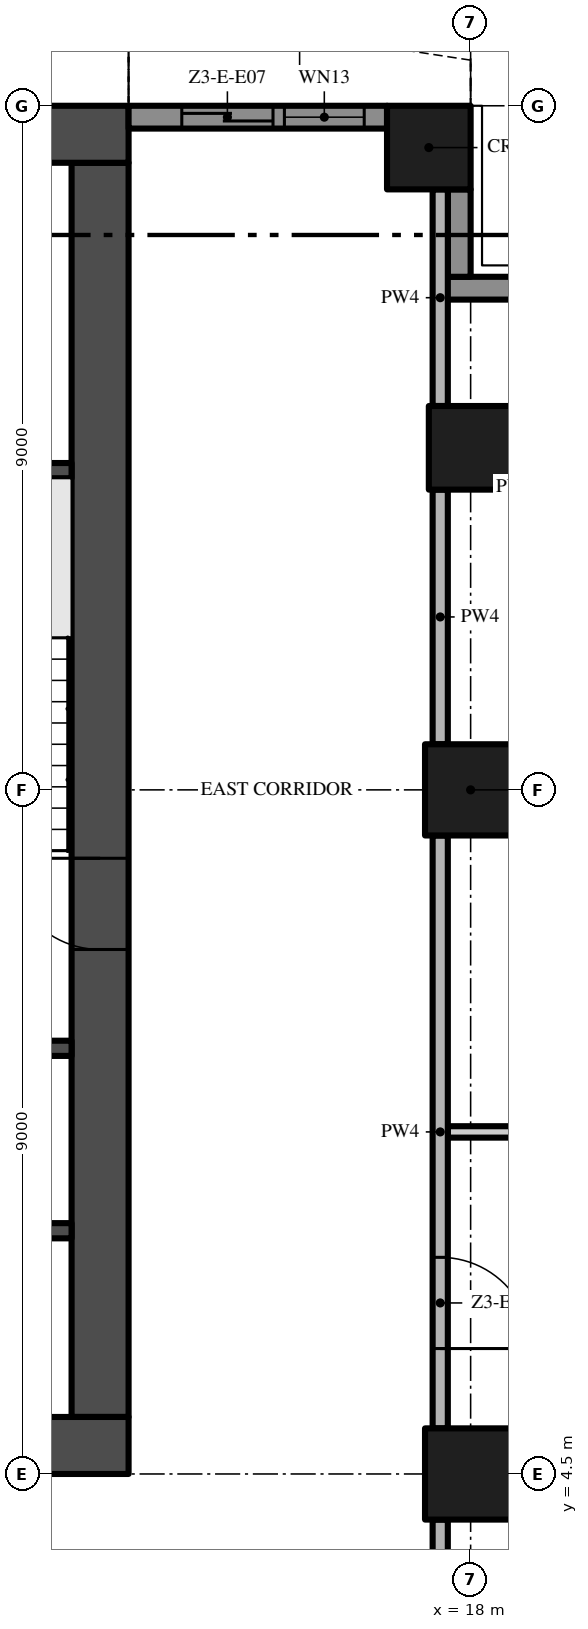
"""IFC4 building model, lengths in metres.
Left out: names, types, materials, properties, quantities, classifications, styles, units other than length and angle.
Written with IfcOpenShell. Run it as: python <this file> out.ifc"""

import sys

from ifc_helpers import new_model, si_unit, direction, frame, frame_2d, origin, origin_2d, place, context, subcontext, project, spatial, polyline, rectangle, outline, extrude, element, fill, save


model = new_model("IFC4")
c1 = context("Model", 3, precision=1e-05, world=origin(), true_north=direction((0.0, 1.0)))
c2 = subcontext(c1, "Body", "Model", "MODEL_VIEW")
j1 = project(units=[si_unit("LENGTHUNIT", "METRE"), si_unit("PLANEANGLEUNIT", "RADIAN")], contexts=[c1])
p1 = place(None, origin())
s1 = spatial("IfcSite", under=j1, at=p1, CompositionType="ELEMENT")
p2 = place(p1, origin())
s2 = spatial("IfcBuilding", under=s1, at=p2, CompositionType="ELEMENT")
p3 = place(p2, frame((0.0, 0.0, 166.8)))
s3 = spatial("IfcBuildingStorey", under=s2, at=p3, CompositionType="ELEMENT", Elevation=166.8)
p4 = place(p3, frame((-13.5, 4.875, -0.3), z_axis=(0.0, 0.0, 1.0), x_axis=(1.0, 0.0, 0.0)))
e1 = element("IfcWall", 1, at=p4, inside=s3, PredefinedType="SHEAR", context=c2, shape_type="SweptSolid", body=[
    extrude(rectangle(XDim=27.0, YDim=0.75, at=frame_2d((13.5, 0.0))), origin(), (0.0, 0.0, 1.0), 3.8),
])
p5 = place(p4, frame((12.0, 0.0, 0.3)))
e2 = element("IfcOpeningElement", 2, at=p5, cuts=e1, PredefinedType="OPENING", context=c2, shape_type="SweptSolid", body=[
    extrude(rectangle(XDim=3.0, YDim=2.4, at=frame_2d((1.5, 1.2))), frame((0.0, 0.385, 0.0), z_axis=(0.0, -1.0, 0.0), x_axis=(1.0, 0.0, 0.0)), (0.0, 0.0, 1.0), 0.77),
])
p6 = place(p4, frame((4.9, 0.0, 0.3)))
e3 = element("IfcOpeningElement", 3, at=p6, cuts=e1, PredefinedType="OPENING", context=c2, shape_type="SweptSolid", body=[
    extrude(rectangle(XDim=1.2, YDim=2.2, at=frame_2d((0.6, 1.1))), frame((0.0, 0.385, 0.0), z_axis=(0.0, -1.0, 0.0), x_axis=(1.0, 0.0, 0.0)), (0.0, 0.0, 1.0), 0.77),
])
p7 = place(p4, frame((20.75, 0.0, 0.3)))
e4 = element("IfcOpeningElement", 4, at=p7, cuts=e1, PredefinedType="OPENING", context=c2, shape_type="SweptSolid", body=[
    extrude(rectangle(XDim=1.5, YDim=2.2, at=frame_2d((0.75, 1.1))), frame((0.0, 0.385, 0.0), z_axis=(0.0, -1.0, 0.0), x_axis=(1.0, 0.0, 0.0)), (0.0, 0.0, 1.0), 0.77),
])
p8 = place(p4, frame((17.4, 0.0, 0.3)))
e5 = element("IfcOpeningElement", 5, at=p8, cuts=e1, PredefinedType="OPENING", context=c2, shape_type="SweptSolid", body=[
    extrude(rectangle(XDim=1.2, YDim=2.2, at=frame_2d((0.6, 1.1))), frame((0.0, 0.385, 0.0), z_axis=(0.0, -1.0, 0.0), x_axis=(1.0, 0.0, 0.0)), (0.0, 0.0, 1.0), 0.77),
])
p9 = place(p3, frame((13.125, 5.25, -0.3), z_axis=(0.0, 0.0, 1.0), x_axis=(0.0, 1.0, 0.0)))
e6 = element("IfcWall", 6, at=p9, inside=s3, PredefinedType="SHEAR", context=c2, shape_type="SweptSolid", body=[
    extrude(rectangle(XDim=16.5, YDim=0.75, at=frame_2d((8.25, 0.0))), origin(), (0.0, 0.0, 1.0), 3.8),
])
p10 = place(p9, frame((6.15, 0.0, 0.3)))
e7 = element("IfcOpeningElement", 7, at=p10, cuts=e6, PredefinedType="OPENING", context=c2, shape_type="SweptSolid", body=[
    extrude(rectangle(XDim=1.2, YDim=2.2, at=frame_2d((0.6, 1.1))), frame((0.0, 0.385, 0.0), z_axis=(0.0, -1.0, 0.0), x_axis=(1.0, 0.0, 0.0)), (0.0, 0.0, 1.0), 0.77),
])
p11 = place(p3, frame((13.5, 22.125, -0.3), z_axis=(0.0, 0.0, 1.0), x_axis=(-1.0, 0.0, 0.0)))
e8 = element("IfcWall", 8, at=p11, inside=s3, PredefinedType="SHEAR", context=c2, shape_type="SweptSolid", body=[
    extrude(rectangle(XDim=27.0, YDim=0.75, at=frame_2d((13.5, 0.0))), origin(), (0.0, 0.0, 1.0), 3.8),
])
p12 = place(p3, frame((18.0, 13.5, 0.0), z_axis=(0.0, 0.0, 1.0), x_axis=(1.0, 0.0, 0.0)))
e9 = element("IfcColumn", 9, at=p12, inside=s3, PredefinedType="COLUMN", context=c2, shape_type="SweptSolid", body=[
    extrude(rectangle(XDim=1.2, YDim=1.2, at=origin_2d()), origin(), (0.0, 0.0, 1.0), 3.5),
])
p13 = place(p3, frame((17.45, 21.95, 0.0), z_axis=(0.0, 0.0, 1.0), x_axis=(1.0, 0.0, 0.0)))
e10 = element("IfcColumn", 10, at=p13, inside=s3, PredefinedType="COLUMN", context=c2, shape_type="SweptSolid", body=[
    extrude(rectangle(XDim=1.1, YDim=1.1, at=origin_2d()), origin(), (0.0, 0.0, 1.0), 3.5),
])
p14 = place(p3, frame((18.0, 4.5, 0.0), z_axis=(0.0, 0.0, 1.0), x_axis=(1.0, 0.0, 0.0)))
e11 = element("IfcColumn", 11, at=p14, inside=s3, PredefinedType="COLUMN", context=c2, shape_type="SweptSolid", body=[
    extrude(rectangle(XDim=1.2, YDim=1.2, at=origin_2d()), origin(), (0.0, 0.0, 1.0), 3.5),
])
p15 = place(p3, frame((18.0, 18.0, 0.0), z_axis=(0.0, 0.0, 1.0), x_axis=(1.0, 0.0, 0.0)))
e12 = element("IfcColumn", 12, at=p15, inside=s3, PredefinedType="COLUMN", context=c2, shape_type="SweptSolid", body=[
    extrude(rectangle(XDim=1.1, YDim=1.1, at=origin_2d()), origin(), (0.0, 0.0, 1.0), 3.5),
])
p16 = place(p3, frame((17.6, 20.1, 0.0), z_axis=(0.0, 0.0, 1.0), x_axis=(1.0, 0.0, 0.0)))
e13 = element("IfcWall", 13, at=p16, inside=s3, PredefinedType="SOLIDWALL", context=c2, shape_type="SweptSolid", body=[
    extrude(rectangle(XDim=2.35, YDim=0.3, at=frame_2d((1.175, 0.0))), origin(), (0.0, 0.0, 1.0), 3.5),
])
p17 = place(p3, frame((17.85, 21.4, 0.0), z_axis=(0.0, 0.0, 1.0), x_axis=(0.0, -1.0, 0.0)))
e14 = element("IfcWall", 14, at=p17, inside=s3, PredefinedType="SOLIDWALL", context=c2, shape_type="SweptSolid", body=[
    extrude(rectangle(XDim=1.15, YDim=0.3, at=frame_2d((0.575, 0.0))), origin(), (0.0, 0.0, 1.0), 3.5),
])
p18 = place(p3, frame((13.5, 22.35, 0.0), z_axis=(0.0, 0.0, 1.0), x_axis=(1.0, 0.0, 0.0)))
e15 = element("IfcWall", 15, at=p18, inside=s3, PredefinedType="SOLIDWALL", context=c2, shape_type="SweptSolid", body=[
    extrude(rectangle(XDim=3.4, YDim=0.3, at=frame_2d((1.7, 0.0))), origin(), (0.0, 0.0, 1.0), 3.5),
])
p19 = place(p18, frame((2.05, 0.0, 0.45)))
e16 = element("IfcOpeningElement", 16, at=p19, cuts=e15, PredefinedType="OPENING", context=c2, shape_type="SweptSolid", body=[
    extrude(rectangle(XDim=1.05, YDim=2.65, at=frame_2d((0.525, 1.325))), frame((0.0, 0.16, 0.0), z_axis=(0.0, -1.0, 0.0), x_axis=(1.0, 0.0, 0.0)), (0.0, 0.0, 1.0), 0.32),
])
p20 = place(p18, frame((0.7, 0.0, 0.0)))
e17 = element("IfcOpeningElement", 17, at=p20, cuts=e15, PredefinedType="OPENING", context=c2, shape_type="SweptSolid", body=[
    extrude(rectangle(XDim=1.2, YDim=2.4, at=frame_2d((0.6, 1.2))), frame((0.0, 0.16, 0.0), z_axis=(0.0, -1.0, 0.0), x_axis=(1.0, 0.0, 0.0)), (0.0, 0.0, 1.0), 0.32),
])
p21 = place(p3, origin())
e18 = element("IfcWall", 18, at=p21, inside=s3, PredefinedType="USERDEFINED", context=c2, shape_type="SweptSolid", body=[
    extrude(outline(polyline([(18.0, 23.1), (16.5, 23.329), (15.0, 23.929), (13.5, 24.671), (13.389, 24.447), (14.898, 23.701), (16.434, 23.086), (17.962, 22.853), (18.0, 23.1)])), origin(), (0.0, 0.0, 1.0), 0.9),
])
for number, where, z_axis, x_axis in (
    (19, (9.65, 7.7, 0.0), (0.0, 0.0, 1.0), (1.0, 0.0, 0.0)),
    (20, (9.65, 10.1, 0.0), (0.0, 0.0, 1.0), (1.0, 0.0, 0.0)),
    (21, (9.65, 17.7, 0.0), (0.0, 0.0, 1.0), (1.0, 0.0, 0.0)),
):
    element("IfcWall", number, at=place(p3, frame(where, z_axis=z_axis, x_axis=x_axis)), inside=s3, PredefinedType="SHEAR", context=c2, shape_type="SweptSolid", body=[
        extrude(rectangle(XDim=3.1, YDim=0.2, at=frame_2d((1.55, 0.0))), origin(), (0.0, 0.0, 1.0), 3.5),
    ])
p22 = place(p3, frame((17.7, 9.0, 0.0), z_axis=(0.0, 0.0, 1.0), x_axis=(1.0, 0.0, 0.0)))
e22 = element("IfcWall", 22, at=p22, inside=s3, PredefinedType="PARTITIONING", context=c2, shape_type="SweptSolid", body=[
    extrude(rectangle(XDim=4.5, YDim=0.15, at=frame_2d((2.25, 0.0))), origin(), (0.0, 0.0, 1.0), 3.5),
])
p23 = place(p22, frame((1.45, 0.0, 0.0)))
e23 = element("IfcOpeningElement", 23, at=p23, cuts=e22, PredefinedType="OPENING", context=c2, shape_type="SweptSolid", body=[
    extrude(rectangle(XDim=1.8, YDim=2.4, at=frame_2d((0.9, 1.2))), frame((0.0, 0.085, 0.0), z_axis=(0.0, -1.0, 0.0), x_axis=(1.0, 0.0, 0.0)), (0.0, 0.0, 1.0), 0.17),
])
p24 = place(p3, frame((17.6, -0.2, 0.0), z_axis=(0.0, 0.0, 1.0), x_axis=(0.0, 1.0, 0.0)))
e24 = element("IfcWall", 24, at=p24, inside=s3, PredefinedType="PARTITIONING", context=c2, shape_type="SweptSolid", body=[
    extrude(rectangle(XDim=4.1, YDim=0.2, at=frame_2d((2.05, 0.0))), origin(), (0.0, 0.0, 1.0), 3.5),
])
p25 = place(p3, frame((17.6, 12.9, 0.0), z_axis=(0.0, 0.0, 1.0), x_axis=(0.0, -1.0, 0.0)))
e25 = element("IfcWall", 25, at=p25, inside=s3, PredefinedType="PARTITIONING", context=c2, shape_type="SweptSolid", body=[
    extrude(rectangle(XDim=7.8, YDim=0.2, at=frame_2d((3.9, 0.0))), origin(), (0.0, 0.0, 1.0), 3.5),
])
p26 = place(p25, frame((5.55, 0.0, 0.0)))
e26 = element("IfcOpeningElement", 26, at=p26, cuts=e25, PredefinedType="OPENING", context=c2, shape_type="SweptSolid", body=[
    extrude(rectangle(XDim=1.2, YDim=2.4, at=frame_2d((0.6, 1.2))), frame((0.0, 0.11, 0.0), z_axis=(0.0, -1.0, 0.0), x_axis=(1.0, 0.0, 0.0)), (0.0, 0.0, 1.0), 0.22),
])
p27 = place(p3, frame((17.6, 14.1, 0.0), z_axis=(0.0, 0.0, 1.0), x_axis=(0.0, 1.0, 0.0)))
e27 = element("IfcWall", 27, at=p27, inside=s3, PredefinedType="PARTITIONING", context=c2, shape_type="SweptSolid", body=[
    extrude(rectangle(XDim=3.35, YDim=0.2, at=frame_2d((1.675, 0.0))), origin(), (0.0, 0.0, 1.0), 3.5),
])
p28 = place(p3, frame((17.6, 18.55, 0.0), z_axis=(0.0, 0.0, 1.0), x_axis=(0.0, 1.0, 0.0)))
e28 = element("IfcWall", 28, at=p28, inside=s3, PredefinedType="PARTITIONING", context=c2, shape_type="SweptSolid", body=[
    extrude(rectangle(XDim=2.85, YDim=0.2, at=frame_2d((1.425, 0.0))), origin(), (0.0, 0.0, 1.0), 3.5),
])
p29 = place(p19, origin())
e29 = element("IfcWindow", 29, at=p29, inside=s3, PartitioningType="SINGLE_PANEL", PredefinedType="WINDOW", context=c2, shape_type="SweptSolid", body=[
    extrude(rectangle(XDim=1.05, YDim=2.65, at=frame_2d((0.525, 1.325))), frame((0.0, 0.03, 0.0), z_axis=(0.0, -1.0, 0.0), x_axis=(1.0, 0.0, 0.0)), (0.0, 0.0, 1.0), 0.06),
])
fill(e16, e29)
p30 = place(p20, origin())
e30 = element("IfcDoor", 30, at=p30, inside=s3, OperationType="SINGLE_SWING_LEFT", PredefinedType="DOOR", context=c2, shape_type="SweptSolid", body=[
    extrude(rectangle(XDim=1.2, YDim=2.4, at=frame_2d((0.6, 1.2))), frame((0.0, 0.025, 0.0), z_axis=(0.0, -1.0, 0.0), x_axis=(1.0, 0.0, 0.0)), (0.0, 0.0, 1.0), 0.05),
])
fill(e17, e30)
p31 = place(p10, frame((1.2, 0.0, 0.0), z_axis=(0.0, 0.0, 1.0), x_axis=(-1.0, 0.0, 0.0)))
e31 = element("IfcDoor", 31, at=p31, inside=s3, OperationType="SINGLE_SWING_LEFT", PredefinedType="DOOR", context=c2, shape_type="SweptSolid", body=[
    extrude(rectangle(XDim=1.2, YDim=2.2, at=frame_2d((0.6, 1.1))), frame((0.0, 0.025, 0.0), z_axis=(0.0, -1.0, 0.0), x_axis=(1.0, 0.0, 0.0)), (0.0, 0.0, 1.0), 0.05),
])
fill(e7, e31)
p32 = place(p26, origin())
e32 = element("IfcDoor", 32, at=p32, inside=s3, OperationType="SINGLE_SWING_RIGHT", PredefinedType="DOOR", context=c2, shape_type="SweptSolid", body=[
    extrude(rectangle(XDim=1.2, YDim=2.4, at=frame_2d((0.6, 1.2))), frame((0.0, 0.025, 0.0), z_axis=(0.0, -1.0, 0.0), x_axis=(1.0, 0.0, 0.0)), (0.0, 0.0, 1.0), 0.05),
])
fill(e26, e32)
save(model, sys.argv[1])
